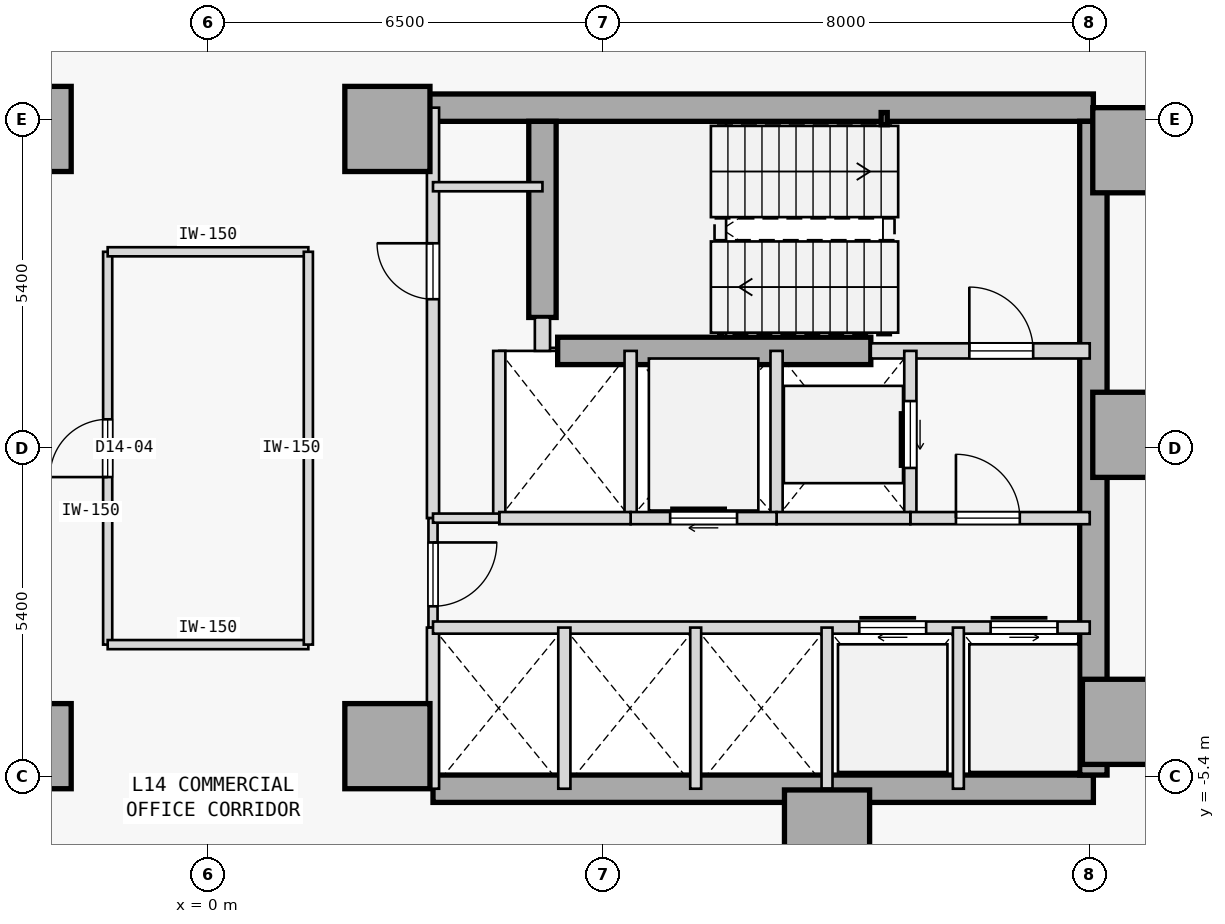
"""IFC4 building model, lengths in metres.
Left out: names, types, materials, properties, quantities, classifications, styles, units other than length and angle.
Written with IfcOpenShell. Run it as: python <this file> out.ifc"""

import sys

from ifc_helpers import new_model, si_unit, direction, frame, frame_2d, origin, origin_2d, place, context, subcontext, project, spatial, rectangle, hollow_rectangle, extrude, element, fill, save


model = new_model("IFC4")
c1 = context("Model", 3, precision=1e-05, world=origin(), true_north=direction((0.0, 1.0)))
c2 = subcontext(c1, "Body", "Model", "MODEL_VIEW")
j1 = project(units=[si_unit("LENGTHUNIT", "METRE"), si_unit("PLANEANGLEUNIT", "RADIAN")], contexts=[c1])
p1 = place(None, origin())
s1 = spatial("IfcSite", under=j1, at=p1, CompositionType="ELEMENT")
p2 = place(p1, origin())
s2 = spatial("IfcBuilding", under=s1, at=p2, CompositionType="ELEMENT")
p3 = place(p2, frame((0.0, 0.0, 59.8)))
s3 = spatial("IfcBuildingStorey", under=s2, at=p3, CompositionType="ELEMENT", Elevation=59.8)
for number, where, z_axis, x_axis in (
    (1, (-2.95, -4.9, 0.0), (0.0, 0.0, 1.0), (1.0, 0.0, 0.0)),
    (2, (-2.95, 5.25, 0.0), (0.0, 0.0, 1.0), (1.0, 0.0, 0.0)),
    (3, (15.25, 4.9, 0.0), (0.0, 0.0, 1.0), (1.0, 0.0, 0.0)),
    (4, (15.25, 0.22, 0.0), (0.0, 0.0, 1.0), (1.0, 0.0, 0.0)),
    (5, (15.08, -4.5, 0.0), (0.0, 0.0, 1.0), (1.0, 0.0, 0.0)),
    (6, (10.18, -6.32, 0.0), (0.0, 0.0, 1.0), (1.0, 0.0, 0.0)),
    (7, (2.95, -4.9, 0.0), (0.0, 0.0, 1.0), (1.0, 0.0, 0.0)),
    (8, (2.95, 5.25, 0.0), (0.0, 0.0, 1.0), (1.0, 0.0, 0.0)),
):
    element("IfcColumn", number, at=place(p3, frame(where, z_axis=z_axis, x_axis=x_axis)), inside=s3, PredefinedType="COLUMN", context=c2, shape_type="SweptSolid", body=[
        extrude(rectangle(XDim=1.4, YDim=1.4, at=origin_2d()), origin(), (0.0, 0.0, 1.0), 3.8),
    ])
p4 = place(p3, frame((3.15, 5.6, 0.0), z_axis=(0.0, 0.0, 1.0), x_axis=(1.0, 0.0, 0.0)))
e9 = element("IfcWall", 9, at=p4, inside=s3, PredefinedType="SHEAR", context=c2, shape_type="SweptSolid", body=[
    extrude(rectangle(XDim=11.41, YDim=0.45, at=frame_2d((5.705, 0.0))), origin(), (0.0, 0.0, 1.0), 3.575),
])
p5 = place(p3, frame((3.7, -5.6, 0.0), z_axis=(0.0, 0.0, 1.0), x_axis=(1.0, 0.0, 0.0)))
e10 = element("IfcWall", 10, at=p5, inside=s3, PredefinedType="SHEAR", context=c2, shape_type="SweptSolid", body=[
    extrude(rectangle(XDim=10.86, YDim=0.45, at=frame_2d((5.43, 0.0))), origin(), (0.0, 0.0, 1.0), 3.575),
])
p6 = place(p3, frame((14.56, -5.375, 0.0), z_axis=(0.0, 0.0, 1.0), x_axis=(0.0, 1.0, 0.0)))
e11 = element("IfcWall", 11, at=p6, inside=s3, PredefinedType="SHEAR", context=c2, shape_type="SweptSolid", body=[
    extrude(rectangle(XDim=10.75, YDim=0.45, at=frame_2d((5.375, 0.0))), origin(), (0.0, 0.0, 1.0), 3.575),
])
p7 = place(p3, frame((5.5, 2.15, 0.0), z_axis=(0.0, 0.0, 1.0), x_axis=(0.0, 1.0, 0.0)))
e12 = element("IfcWall", 12, at=p7, inside=s3, PredefinedType="SHEAR", context=c2, shape_type="SweptSolid", body=[
    extrude(rectangle(XDim=3.225, YDim=0.45, at=frame_2d((1.613, 0.0))), origin(), (0.0, 0.0, 1.0), 3.575),
])
p8 = place(p3, frame((5.75, 1.6, 0.0), z_axis=(0.0, 0.0, 1.0), x_axis=(1.0, 0.0, 0.0)))
e13 = element("IfcWall", 13, at=p8, inside=s3, PredefinedType="SHEAR", context=c2, shape_type="SweptSolid", body=[
    extrude(rectangle(XDim=5.15, YDim=0.45, at=frame_2d((2.575, 0.0))), origin(), (0.0, 0.0, 1.0), 3.575),
])
p9 = place(p3, frame((11.12, 5.42, 0.0), z_axis=(0.0, 0.0, 1.0), x_axis=(1.0, 0.0, 0.0)))
e14 = element("IfcColumn", 14, at=p9, inside=s3, PredefinedType="COLUMN", context=c2, shape_type="SweptSolid", body=[
    extrude(hollow_rectangle(XDim=0.1, YDim=0.2, WallThickness=0.008, at=origin_2d()), origin(), (0.0, 0.0, 1.0), 3.8),
])
p10 = place(p3, frame((10.9, 1.6, 0.0), z_axis=(0.0, 0.0, 1.0), x_axis=(1.0, 0.0, 0.0)))
e15 = element("IfcWall", 15, at=p10, inside=s3, PredefinedType="STANDARD", context=c2, shape_type="SweptSolid", body=[
    extrude(rectangle(XDim=3.6, YDim=0.25, at=frame_2d((1.8, 0.0))), origin(), (0.0, 0.0, 1.0), 3.575),
])
p11 = place(p10, frame((1.62, 0.0, 0.0)))
e16 = element("IfcOpeningElement", 16, at=p11, cuts=e15, PredefinedType="OPENING", context=c2, shape_type="SweptSolid", body=[
    extrude(rectangle(XDim=1.05, YDim=2.15, at=frame_2d((0.525, 1.075))), frame((0.0, 0.135, 0.0), z_axis=(0.0, -1.0, 0.0), x_axis=(1.0, 0.0, 0.0)), (0.0, 0.0, 1.0), 0.27),
])
p12 = place(p3, frame((5.5, 1.6, 0.0), z_axis=(0.0, 0.0, 1.0), x_axis=(0.0, 1.0, 0.0)))
e17 = element("IfcWall", 17, at=p12, inside=s3, PredefinedType="STANDARD", context=c2, shape_type="SweptSolid", body=[
    extrude(rectangle(XDim=0.55, YDim=0.25, at=frame_2d((0.275, 0.0))), origin(), (0.0, 0.0, 1.0), 3.575),
])
p13 = place(p3, frame((3.7, -1.15, 0.0), z_axis=(0.0, 0.0, 1.0), x_axis=(0.0, 1.0, 0.0)))
e18 = element("IfcWall", 18, at=p13, inside=s3, PredefinedType="STANDARD", context=c2, shape_type="SweptSolid", body=[
    extrude(rectangle(XDim=6.75, YDim=0.2, at=frame_2d((3.375, 0.0))), origin(), (0.0, 0.0, 1.0), 3.575),
])
p14 = place(p13, frame((3.6, 0.0, 0.0)))
e19 = element("IfcOpeningElement", 19, at=p14, cuts=e18, PredefinedType="OPENING", context=c2, shape_type="SweptSolid", body=[
    extrude(rectangle(XDim=0.92, YDim=2.15, at=frame_2d((0.46, 1.075))), frame((0.0, 0.11, 0.0), z_axis=(0.0, -1.0, 0.0), x_axis=(1.0, 0.0, 0.0)), (0.0, 0.0, 1.0), 0.22),
])
p15 = place(p3, frame((3.7, -2.95, 0.0), z_axis=(0.0, 0.0, 1.0), x_axis=(0.0, 1.0, 0.0)))
e20 = element("IfcWall", 20, at=p15, inside=s3, PredefinedType="PARTITIONING", context=c2, shape_type="SweptSolid", body=[
    extrude(rectangle(XDim=1.8, YDim=0.15, at=frame_2d((0.9, 0.0))), origin(), (0.0, 0.0, 1.0), 3.575),
])
p16 = place(p15, frame((0.35, 0.0, 0.0)))
e21 = element("IfcOpeningElement", 21, at=p16, cuts=e20, PredefinedType="OPENING", context=c2, shape_type="SweptSolid", body=[
    extrude(rectangle(XDim=1.05, YDim=2.18, at=frame_2d((0.525, 1.09))), frame((0.0, 0.085, 0.0), z_axis=(0.0, -1.0, 0.0), x_axis=(1.0, 0.0, 0.0)), (0.0, 0.0, 1.0), 0.17),
])
p17 = place(p3, frame((3.7, -5.6, 0.0), z_axis=(0.0, 0.0, 1.0), x_axis=(0.0, 1.0, 0.0)))
e22 = element("IfcWall", 22, at=p17, inside=s3, PredefinedType="STANDARD", context=c2, shape_type="SweptSolid", body=[
    extrude(rectangle(XDim=2.65, YDim=0.2, at=frame_2d((1.325, 0.0))), origin(), (0.0, 0.0, 1.0), 3.575),
])
p18 = place(p3, frame((11.55, -1.15, 0.0), z_axis=(0.0, 0.0, 1.0), x_axis=(0.0, 1.0, 0.0)))
e23 = element("IfcWall", 23, at=p18, inside=s3, PredefinedType="STANDARD", context=c2, shape_type="SweptSolid", body=[
    extrude(rectangle(XDim=2.75, YDim=0.2, at=frame_2d((1.375, 0.0))), origin(), (0.0, 0.0, 1.0), 3.575),
])
p19 = place(p18, frame((0.825, 0.0, 0.0)))
e24 = element("IfcOpeningElement", 24, at=p19, cuts=e23, PredefinedType="OPENING", context=c2, shape_type="SweptSolid", body=[
    extrude(rectangle(XDim=1.1, YDim=2.15, at=frame_2d((0.55, 1.075))), frame((0.0, 0.11, 0.0), z_axis=(0.0, -1.0, 0.0), x_axis=(1.0, 0.0, 0.0)), (0.0, 0.0, 1.0), 0.22),
])
p20 = place(p3, frame((9.35, -1.15, 0.0), z_axis=(0.0, 0.0, 1.0), x_axis=(0.0, 1.0, 0.0)))
e25 = element("IfcWall", 25, at=p20, inside=s3, PredefinedType="STANDARD", context=c2, shape_type="SweptSolid", body=[
    extrude(rectangle(XDim=2.75, YDim=0.2, at=frame_2d((1.375, 0.0))), origin(), (0.0, 0.0, 1.0), 3.575),
])
p21 = place(p3, frame((11.55, -1.15, 0.0), z_axis=(0.0, 0.0, 1.0), x_axis=(1.0, 0.0, 0.0)))
e26 = element("IfcWall", 26, at=p21, inside=s3, PredefinedType="STANDARD", context=c2, shape_type="SweptSolid", body=[
    extrude(rectangle(XDim=2.95, YDim=0.2, at=frame_2d((1.475, 0.0))), origin(), (0.0, 0.0, 1.0), 3.575),
])
p22 = place(p21, frame((0.75, 0.0, 0.0)))
e27 = element("IfcOpeningElement", 27, at=p22, cuts=e26, PredefinedType="OPENING", context=c2, shape_type="SweptSolid", body=[
    extrude(rectangle(XDim=1.05, YDim=2.18, at=frame_2d((0.525, 1.09))), frame((0.0, 0.11, 0.0), z_axis=(0.0, -1.0, 0.0), x_axis=(1.0, 0.0, 0.0)), (0.0, 0.0, 1.0), 0.22),
])
p23 = place(p3, frame((9.35, -1.15, 0.0), z_axis=(0.0, 0.0, 1.0), x_axis=(1.0, 0.0, 0.0)))
e28 = element("IfcWall", 28, at=p23, inside=s3, PredefinedType="STANDARD", context=c2, shape_type="SweptSolid", body=[
    extrude(rectangle(XDim=2.2, YDim=0.2, at=frame_2d((1.1, 0.0))), origin(), (0.0, 0.0, 1.0), 3.575),
])
p24 = place(p3, frame((6.95, -1.15, 0.0), z_axis=(0.0, 0.0, 1.0), x_axis=(0.0, 1.0, 0.0)))
e29 = element("IfcWall", 29, at=p24, inside=s3, PredefinedType="STANDARD", context=c2, shape_type="SweptSolid", body=[
    extrude(rectangle(XDim=2.75, YDim=0.2, at=frame_2d((1.375, 0.0))), origin(), (0.0, 0.0, 1.0), 3.575),
])
p25 = place(p3, frame((6.95, -1.15, 0.0), z_axis=(0.0, 0.0, 1.0), x_axis=(1.0, 0.0, 0.0)))
e30 = element("IfcWall", 30, at=p25, inside=s3, PredefinedType="STANDARD", context=c2, shape_type="SweptSolid", body=[
    extrude(rectangle(XDim=2.4, YDim=0.2, at=frame_2d((1.2, 0.0))), origin(), (0.0, 0.0, 1.0), 3.575),
])
p26 = place(p25, frame((0.65, 0.0, 0.0)))
e31 = element("IfcOpeningElement", 31, at=p26, cuts=e30, PredefinedType="OPENING", context=c2, shape_type="SweptSolid", body=[
    extrude(rectangle(XDim=1.1, YDim=2.15, at=frame_2d((0.55, 1.075))), frame((0.0, 0.11, 0.0), z_axis=(0.0, -1.0, 0.0), x_axis=(1.0, 0.0, 0.0)), (0.0, 0.0, 1.0), 0.22),
])
p27 = place(p3, frame((4.79, -1.15, 0.0), z_axis=(0.0, 0.0, 1.0), x_axis=(0.0, 1.0, 0.0)))
e32 = element("IfcWall", 32, at=p27, inside=s3, PredefinedType="STANDARD", context=c2, shape_type="SweptSolid", body=[
    extrude(rectangle(XDim=2.75, YDim=0.2, at=frame_2d((1.375, 0.0))), origin(), (0.0, 0.0, 1.0), 3.575),
])
p28 = place(p3, frame((4.79, -1.15, 0.0), z_axis=(0.0, 0.0, 1.0), x_axis=(1.0, 0.0, 0.0)))
e33 = element("IfcWall", 33, at=p28, inside=s3, PredefinedType="STANDARD", context=c2, shape_type="SweptSolid", body=[
    extrude(rectangle(XDim=2.16, YDim=0.2, at=frame_2d((1.08, 0.0))), origin(), (0.0, 0.0, 1.0), 3.575),
])
p29 = place(p3, frame((3.7, -1.15, 0.0), z_axis=(0.0, 0.0, 1.0), x_axis=(1.0, 0.0, 0.0)))
e34 = element("IfcWall", 34, at=p29, inside=s3, PredefinedType="PARTITIONING", context=c2, shape_type="SweptSolid", body=[
    extrude(rectangle(XDim=1.09, YDim=0.15, at=frame_2d((0.545, 0.0))), origin(), (0.0, 0.0, 1.0), 3.575),
])
p30 = place(p3, frame((3.7, -2.95, 0.0), z_axis=(0.0, 0.0, 1.0), x_axis=(1.0, 0.0, 0.0)))
e35 = element("IfcWall", 35, at=p30, inside=s3, PredefinedType="STANDARD", context=c2, shape_type="SweptSolid", body=[
    extrude(rectangle(XDim=10.8, YDim=0.2, at=frame_2d((5.4, 0.0))), origin(), (0.0, 0.0, 1.0), 3.575),
])
p31 = place(p30, frame((7.01, 0.0, 0.0)))
e36 = element("IfcOpeningElement", 36, at=p31, cuts=e35, PredefinedType="OPENING", context=c2, shape_type="SweptSolid", body=[
    extrude(rectangle(XDim=1.1, YDim=2.15, at=frame_2d((0.55, 1.075))), frame((0.0, 0.11, 0.0), z_axis=(0.0, -1.0, 0.0), x_axis=(1.0, 0.0, 0.0)), (0.0, 0.0, 1.0), 0.22),
])
p32 = place(p30, frame((9.17, 0.0, 0.0)))
e37 = element("IfcOpeningElement", 37, at=p32, cuts=e35, PredefinedType="OPENING", context=c2, shape_type="SweptSolid", body=[
    extrude(rectangle(XDim=1.1, YDim=2.15, at=frame_2d((0.55, 1.075))), frame((0.0, 0.11, 0.0), z_axis=(0.0, -1.0, 0.0), x_axis=(1.0, 0.0, 0.0)), (0.0, 0.0, 1.0), 0.22),
])
p33 = place(p3, frame((5.86, -5.6, 0.0), z_axis=(0.0, 0.0, 1.0), x_axis=(0.0, 1.0, 0.0)))
e38 = element("IfcWall", 38, at=p33, inside=s3, PredefinedType="STANDARD", context=c2, shape_type="SweptSolid", body=[
    extrude(rectangle(XDim=2.65, YDim=0.2, at=frame_2d((1.325, 0.0))), origin(), (0.0, 0.0, 1.0), 3.575),
])
for number, where, z_axis, x_axis in (
    (39, (12.34, -5.6, 0.0), (0.0, 0.0, 1.0), (0.0, 1.0, 0.0)),
    (40, (10.18, -5.6, 0.0), (0.0, 0.0, 1.0), (0.0, 1.0, 0.0)),
    (41, (8.02, -5.6, 0.0), (0.0, 0.0, 1.0), (0.0, 1.0, 0.0)),
):
    element("IfcWall", number, at=place(p3, frame(where, z_axis=z_axis, x_axis=x_axis)), inside=s3, PredefinedType="STANDARD", context=c2, shape_type="SweptSolid", body=[
        extrude(rectangle(XDim=2.65, YDim=0.18, at=frame_2d((1.325, 0.0))), origin(), (0.0, 0.0, 1.0), 3.575),
    ])
p34 = place(p3, frame((3.7, 4.3, 0.0), z_axis=(0.0, 0.0, 1.0), x_axis=(1.0, 0.0, 0.0)))
e42 = element("IfcWall", 42, at=p34, inside=s3, PredefinedType="PARTITIONING", context=c2, shape_type="SweptSolid", body=[
    extrude(rectangle(XDim=1.8, YDim=0.15, at=frame_2d((0.9, 0.0))), origin(), (0.0, 0.0, 1.0), 3.575),
])
p35 = place(p3, frame((-1.65, -3.23, 0.0), z_axis=(0.0, 0.0, 1.0), x_axis=(0.0, 1.0, 0.0)))
e43 = element("IfcWall", 43, at=p35, inside=s3, PredefinedType="PARTITIONING", context=c2, shape_type="SweptSolid", body=[
    extrude(rectangle(XDim=6.46, YDim=0.15, at=frame_2d((3.23, 0.0))), origin(), (0.0, 0.0, 1.0), 3.575),
])
p36 = place(p35, frame((2.755, 0.0, 0.0)))
e44 = element("IfcOpeningElement", 44, at=p36, cuts=e43, PredefinedType="OPENING", context=c2, shape_type="SweptSolid", body=[
    extrude(rectangle(XDim=0.95, YDim=2.15, at=frame_2d((0.475, 1.075))), frame((0.0, 0.085, 0.0), z_axis=(0.0, -1.0, 0.0), x_axis=(1.0, 0.0, 0.0)), (0.0, 0.0, 1.0), 0.17),
])
for number, where, z_axis, x_axis in (
    (45, (-1.65, -3.23, 0.0), (0.0, 0.0, 1.0), (1.0, 0.0, 0.0)),
    (46, (-1.65, 3.23, 0.0), (0.0, 0.0, 1.0), (1.0, 0.0, 0.0)),
):
    element("IfcWall", number, at=place(p3, frame(where, z_axis=z_axis, x_axis=x_axis)), inside=s3, PredefinedType="PARTITIONING", context=c2, shape_type="SweptSolid", body=[
        extrude(rectangle(XDim=3.3, YDim=0.15, at=frame_2d((1.65, 0.0))), origin(), (0.0, 0.0, 1.0), 3.575),
    ])
p37 = place(p3, frame((1.65, -3.23, 0.0), z_axis=(0.0, 0.0, 1.0), x_axis=(0.0, 1.0, 0.0)))
e47 = element("IfcWall", 47, at=p37, inside=s3, PredefinedType="PARTITIONING", context=c2, shape_type="SweptSolid", body=[
    extrude(rectangle(XDim=6.46, YDim=0.15, at=frame_2d((3.23, 0.0))), origin(), (0.0, 0.0, 1.0), 3.575),
])
p38 = place(p11, origin())
e48 = element("IfcDoor", 48, at=p38, inside=s3, OperationType="SINGLE_SWING_LEFT", PredefinedType="DOOR", context=c2, shape_type="SweptSolid", body=[
    extrude(rectangle(XDim=1.05, YDim=2.15, at=frame_2d((0.525, 1.075))), frame((0.0, 0.025, 0.0), z_axis=(0.0, -1.0, 0.0), x_axis=(1.0, 0.0, 0.0)), (0.0, 0.0, 1.0), 0.05),
])
fill(e16, e48)
p39 = place(p22, origin())
e49 = element("IfcDoor", 49, at=p39, inside=s3, OperationType="SINGLE_SWING_LEFT", PredefinedType="DOOR", context=c2, shape_type="SweptSolid", body=[
    extrude(rectangle(XDim=1.05, YDim=2.18, at=frame_2d((0.525, 1.09))), frame((0.0, 0.025, 0.0), z_axis=(0.0, -1.0, 0.0), x_axis=(1.0, 0.0, 0.0)), (0.0, 0.0, 1.0), 0.05),
])
fill(e27, e49)
p40 = place(p16, frame((1.05, 0.0, 0.0), z_axis=(0.0, 0.0, 1.0), x_axis=(-1.0, 0.0, 0.0)))
e50 = element("IfcDoor", 50, at=p40, inside=s3, OperationType="SINGLE_SWING_RIGHT", PredefinedType="DOOR", context=c2, shape_type="SweptSolid", body=[
    extrude(rectangle(XDim=1.05, YDim=2.18, at=frame_2d((0.525, 1.09))), frame((0.0, 0.025, 0.0), z_axis=(0.0, -1.0, 0.0), x_axis=(1.0, 0.0, 0.0)), (0.0, 0.0, 1.0), 0.05),
])
fill(e21, e50)
p41 = place(p19, origin())
e51 = element("IfcDoor", 51, at=p41, inside=s3, OperationType="SLIDING_TO_RIGHT", PredefinedType="DOOR", context=c2, shape_type="SweptSolid", body=[
    extrude(rectangle(XDim=1.1, YDim=2.15, at=frame_2d((0.55, 1.075))), frame((0.0, 0.025, 0.0), z_axis=(0.0, -1.0, 0.0), x_axis=(1.0, 0.0, 0.0)), (0.0, 0.0, 1.0), 0.05),
])
fill(e24, e51)
p42 = place(p26, origin())
e52 = element("IfcDoor", 52, at=p42, inside=s3, OperationType="SLIDING_TO_RIGHT", PredefinedType="DOOR", context=c2, shape_type="SweptSolid", body=[
    extrude(rectangle(XDim=1.1, YDim=2.15, at=frame_2d((0.55, 1.075))), frame((0.0, 0.025, 0.0), z_axis=(0.0, -1.0, 0.0), x_axis=(1.0, 0.0, 0.0)), (0.0, 0.0, 1.0), 0.05),
])
fill(e31, e52)
p43 = place(p31, origin())
e53 = element("IfcDoor", 53, at=p43, inside=s3, OperationType="SLIDING_TO_RIGHT", PredefinedType="DOOR", context=c2, shape_type="SweptSolid", body=[
    extrude(rectangle(XDim=1.1, YDim=2.15, at=frame_2d((0.55, 1.075))), frame((0.0, 0.025, 0.0), z_axis=(0.0, -1.0, 0.0), x_axis=(1.0, 0.0, 0.0)), (0.0, 0.0, 1.0), 0.05),
])
fill(e36, e53)
p44 = place(p32, origin())
e54 = element("IfcDoor", 54, at=p44, inside=s3, OperationType="SLIDING_TO_LEFT", PredefinedType="DOOR", context=c2, shape_type="SweptSolid", body=[
    extrude(rectangle(XDim=1.1, YDim=2.15, at=frame_2d((0.55, 1.075))), frame((0.0, 0.025, 0.0), z_axis=(0.0, -1.0, 0.0), x_axis=(1.0, 0.0, 0.0)), (0.0, 0.0, 1.0), 0.05),
])
fill(e37, e54)
p45 = place(p14, origin())
e55 = element("IfcDoor", 55, at=p45, inside=s3, OperationType="SINGLE_SWING_RIGHT", PredefinedType="DOOR", context=c2, shape_type="SweptSolid", body=[
    extrude(rectangle(XDim=0.92, YDim=2.15, at=frame_2d((0.46, 1.075))), frame((0.0, 0.025, 0.0), z_axis=(0.0, -1.0, 0.0), x_axis=(1.0, 0.0, 0.0)), (0.0, 0.0, 1.0), 0.05),
])
fill(e19, e55)
p46 = place(p36, origin())
e56 = element("IfcDoor", 56, at=p46, inside=s3, OperationType="SINGLE_SWING_LEFT", PredefinedType="DOOR", context=c2, shape_type="SweptSolid", body=[
    extrude(rectangle(XDim=0.95, YDim=2.15, at=frame_2d((0.475, 1.075))), frame((0.0, 0.025, 0.0), z_axis=(0.0, -1.0, 0.0), x_axis=(1.0, 0.0, 0.0)), (0.0, 0.0, 1.0), 0.05),
])
fill(e44, e56)
save(model, sys.argv[1])
